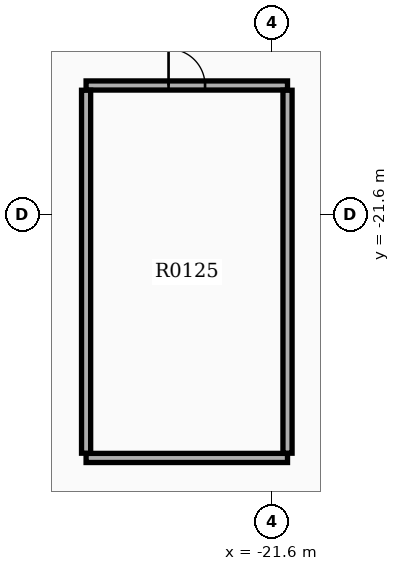
"""IFC4 building model, lengths in metres.
Left out: names, types, materials, properties, quantities, classifications, styles, units other than length and angle.
Written with IfcOpenShell. Run it as: python <this file> out.ifc"""

import sys

from ifc_helpers import new_model, si_unit, direction, frame, frame_2d, origin, place, context, subcontext, project, spatial, rectangle, extrude, element, fill, save


model = new_model("IFC4")
c1 = context("Model", 3, precision=1e-05, world=origin(), true_north=direction((0.0, 1.0)))
c2 = subcontext(c1, "Body", "Model", "MODEL_VIEW")
j1 = project(units=[si_unit("LENGTHUNIT", "METRE"), si_unit("PLANEANGLEUNIT", "RADIAN")], contexts=[c1])
p1 = place(None, origin())
s1 = spatial("IfcSite", under=j1, at=p1, CompositionType="ELEMENT")
p2 = place(p1, origin())
s2 = spatial("IfcBuilding", under=s1, at=p2, CompositionType="ELEMENT")
p3 = place(p2, origin())
s3 = spatial("IfcBuildingStorey", under=s2, at=p3, CompositionType="ELEMENT", Elevation=0.0)
p4 = place(p3, frame((-26.5, -28.0, 0.0), z_axis=(0.0, 0.0, 1.0), x_axis=(1.0, 0.0, 0.0)))
e1 = element("IfcWall", 1, at=p4, inside=s3, PredefinedType="SOLIDWALL", context=c2, shape_type="SweptSolid", body=[
    extrude(rectangle(XDim=5.3, YDim=0.24, at=frame_2d((2.65, 0.0))), origin(), (0.0, 0.0, 1.0), 2.67),
])
p5 = place(p3, frame((-26.5, -18.2, 0.0), z_axis=(0.0, 0.0, 1.0), x_axis=(1.0, 0.0, 0.0)))
e2 = element("IfcWall", 2, at=p5, inside=s3, PredefinedType="SOLIDWALL", context=c2, shape_type="SweptSolid", body=[
    extrude(rectangle(XDim=5.3, YDim=0.24, at=frame_2d((2.65, 0.0))), origin(), (0.0, 0.0, 1.0), 2.67),
])
p6 = place(p5, frame((2.17, 0.0, 0.0)))
e3 = element("IfcOpeningElement", 3, at=p6, cuts=e2, PredefinedType="OPENING", context=c2, shape_type="SweptSolid", body=[
    extrude(rectangle(XDim=0.96, YDim=2.15, at=frame_2d((0.48, 1.075))), frame((0.0, 0.13, 0.0), z_axis=(0.0, -1.0, 0.0), x_axis=(1.0, 0.0, 0.0)), (0.0, 0.0, 1.0), 0.26),
])
for number, where, z_axis, x_axis in (
    (4, (-26.5, -27.875, 0.0), (0.0, 0.0, 1.0), (0.0, 1.0, 0.0)),
    (5, (-21.2, -27.875, 0.0), (0.0, 0.0, 1.0), (0.0, 1.0, 0.0)),
):
    element("IfcWall", number, at=place(p3, frame(where, z_axis=z_axis, x_axis=x_axis)), inside=s3, PredefinedType="SOLIDWALL", context=c2, shape_type="SweptSolid", body=[
        extrude(rectangle(XDim=9.55, YDim=0.24, at=frame_2d((4.775, 0.0))), origin(), (0.0, 0.0, 1.0), 2.67),
    ])
p7 = place(p6, origin())
e6 = element("IfcDoor", 6, at=p7, inside=s3, OperationType="SINGLE_SWING_LEFT", PredefinedType="DOOR", context=c2, shape_type="SweptSolid", body=[
    extrude(rectangle(XDim=0.96, YDim=2.15, at=frame_2d((0.48, 1.075))), frame((0.0, 0.025, 0.0), z_axis=(0.0, -1.0, 0.0), x_axis=(1.0, 0.0, 0.0)), (0.0, 0.0, 1.0), 0.05),
])
fill(e3, e6)
save(model, sys.argv[1])
